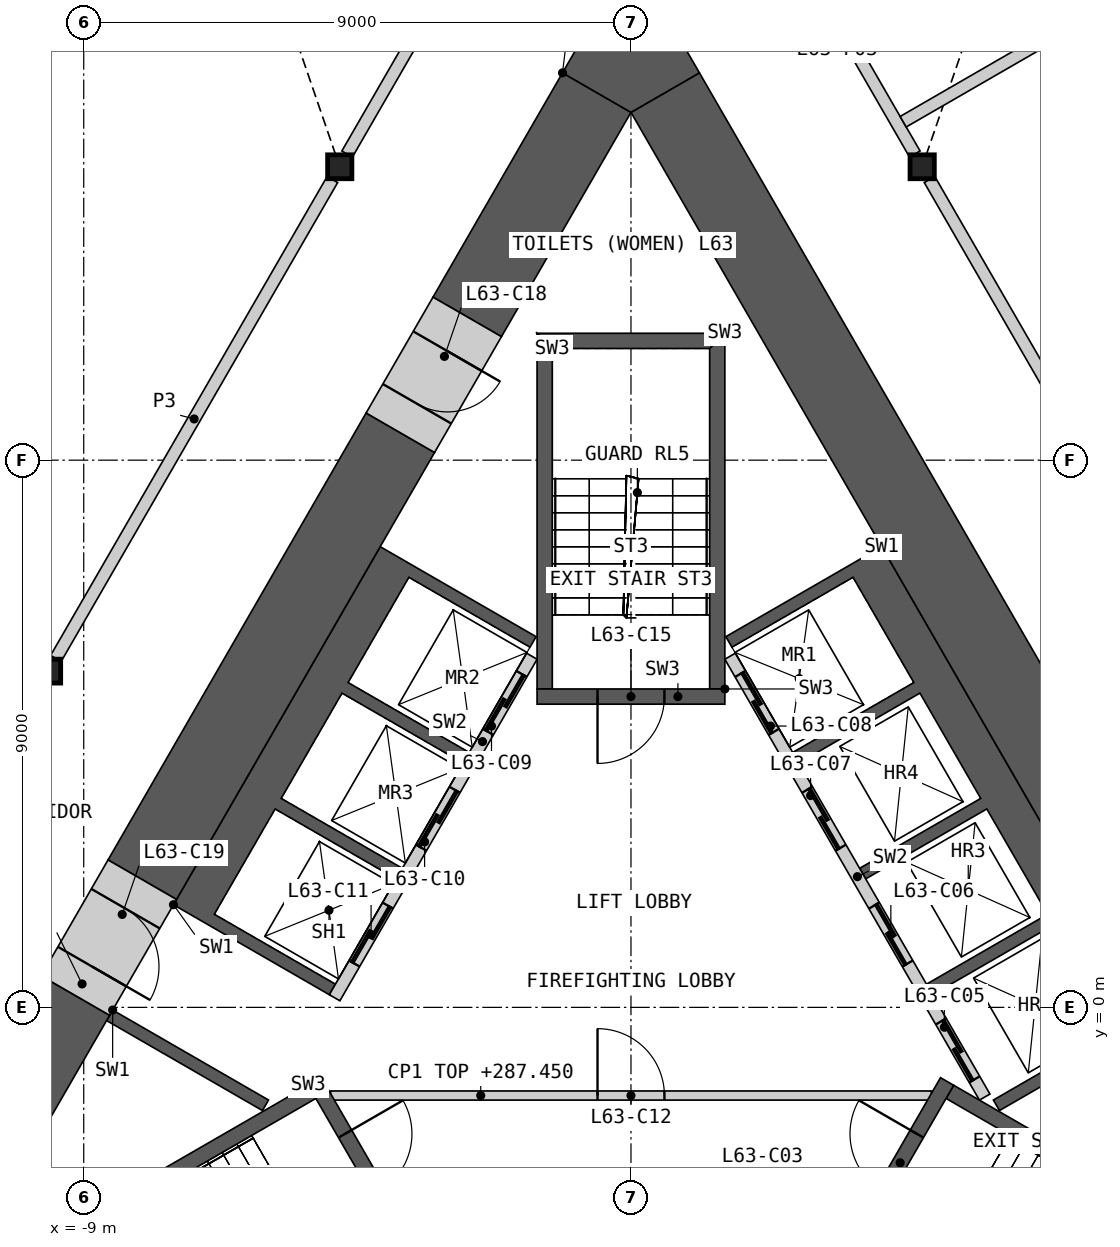
"""IFC4 building model, lengths in metres.
Left out: names, types, materials, properties, quantities, classifications, styles, units other than length and angle.
Written with IfcOpenShell. Run it as: python <this file> out.ifc"""

import sys

from ifc_helpers import new_model, si_unit, direction, frame, frame_2d, origin, origin_2d, place, context, subcontext, project, spatial, polyline, rectangle, i_section, outline, extrude, element, fill, save


model = new_model("IFC4")
c1 = context("Model", 3, precision=1e-05, world=origin(), true_north=direction((0.0, 1.0)))
c2 = subcontext(c1, "Body", "Model", "MODEL_VIEW")
j1 = project(units=[si_unit("LENGTHUNIT", "METRE"), si_unit("PLANEANGLEUNIT", "RADIAN")], contexts=[c1])
p1 = place(None, origin())
s1 = spatial("IfcSite", under=j1, at=p1, CompositionType="ELEMENT")
p2 = place(p1, origin())
s2 = spatial("IfcBuilding", under=s1, at=p2, CompositionType="ELEMENT")
p3 = place(p2, frame((0.0, 0.0, 277.8)))
s3 = spatial("IfcBuildingStorey", under=s2, at=p3, CompositionType="ELEMENT", Elevation=277.8)
for number, where, z_axis, x_axis in (
    (1, (-4.789, 13.825, 0.0), (0.0, 0.0, 1.0), (1.0, 0.0, 0.0)),
    (2, (-9.578, 5.53, 0.0), (0.0, 0.0, 1.0), (1.0, 0.0, 0.0)),
    (3, (4.789, 13.825, 0.0), (0.0, 0.0, 1.0), (1.0, 0.0, 0.0)),
):
    element("IfcColumn", number, at=place(p3, frame(where, z_axis=z_axis, x_axis=x_axis)), inside=s3, PredefinedType="COLUMN", context=c2, shape_type="SweptSolid", body=[
        extrude(i_section(OverallWidth=0.399, OverallDepth=0.393, WebThickness=0.023, FlangeThickness=0.037, at=origin_2d()), origin(), (0.0, 0.0, 1.0), 10.0),
    ])
p4 = place(p3, origin())
e4 = element("IfcWall", 4, at=p4, inside=s3, PredefinedType="SHEAR", context=c2, shape_type="SweptSolid", body=[
    extrude(outline(polyline([(4.124, 7.577), (8.624, -0.217), (8.231, -0.444), (6.061, -1.697), (5.96, -1.524), (7.952, -0.374), (6.952, 1.358), (4.96, 0.208), (4.861, 0.381), (6.852, 1.531), (5.852, 3.263), (3.861, 2.113), (3.76, 2.287), (5.752, 3.437), (4.752, 5.169), (2.76, 4.019), (2.66, 4.192), (4.652, 5.342), (3.652, 7.074), (1.66, 5.924), (1.561, 6.097), (3.731, 7.35), (4.124, 7.577)])), origin(), (0.0, 0.0, 1.0), 9.65),
])
p5 = place(p3, frame((5.817, -1.476, 0.0), z_axis=(0.0, 0.0, 1.0), x_axis=(-0.500002616675, 0.866023893041, 0.0)))
e5 = element("IfcWall", 5, at=p5, inside=s3, PredefinedType="SOLIDWALL", context=c2, shape_type="SweptSolid", body=[
    extrude(rectangle(XDim=8.373, YDim=0.2, at=frame_2d((4.187, 0.0))), origin(), (0.0, 0.0, 1.0), 9.65),
])
p6 = place(p5, frame((0.337, 0.0, 0.0)))
e6 = element("IfcOpeningElement", 6, at=p6, cuts=e5, PredefinedType="OPENING", context=c2, shape_type="SweptSolid", body=[
    extrude(rectangle(XDim=1.1, YDim=2.1, at=frame_2d((0.55, 1.05))), frame((0.0, 0.11, 0.0), z_axis=(0.0, -1.0, 0.0), x_axis=(1.0, 0.0, 0.0)), (0.0, 0.0, 1.0), 0.22),
])
p7 = place(p5, frame((2.537, 0.0, 0.0)))
e7 = element("IfcOpeningElement", 7, at=p7, cuts=e5, PredefinedType="OPENING", context=c2, shape_type="SweptSolid", body=[
    extrude(rectangle(XDim=1.1, YDim=2.1, at=frame_2d((0.55, 1.05))), frame((0.0, 0.11, 0.0), z_axis=(0.0, -1.0, 0.0), x_axis=(1.0, 0.0, 0.0)), (0.0, 0.0, 1.0), 0.22),
])
p8 = place(p5, frame((4.737, 0.0, 0.0)))
e8 = element("IfcOpeningElement", 8, at=p8, cuts=e5, PredefinedType="OPENING", context=c2, shape_type="SweptSolid", body=[
    extrude(rectangle(XDim=1.1, YDim=2.1, at=frame_2d((0.55, 1.05))), frame((0.0, 0.11, 0.0), z_axis=(0.0, -1.0, 0.0), x_axis=(1.0, 0.0, 0.0)), (0.0, 0.0, 1.0), 0.22),
])
p9 = place(p5, frame((6.937, 0.0, 0.0)))
e9 = element("IfcOpeningElement", 9, at=p9, cuts=e5, PredefinedType="OPENING", context=c2, shape_type="SweptSolid", body=[
    extrude(rectangle(XDim=1.1, YDim=2.1, at=frame_2d((0.55, 1.05))), frame((0.0, 0.11, 0.0), z_axis=(0.0, -1.0, 0.0), x_axis=(1.0, 0.0, 0.0)), (0.0, 0.0, 1.0), 0.22),
])
p10 = place(p3, origin())
e10 = element("IfcWall", 10, at=p10, inside=s3, PredefinedType="SHEAR", context=c2, shape_type="SweptSolid", body=[
    extrude(outline(polyline([(-7.524, 1.688), (-4.124, 7.577), (-3.731, 7.35), (-1.561, 6.097), (-1.66, 5.924), (-3.652, 7.074), (-4.652, 5.342), (-2.66, 4.192), (-2.76, 4.019), (-4.752, 5.169), (-5.752, 3.437), (-3.76, 2.287), (-3.861, 2.113), (-5.852, 3.263), (-6.852, 1.531), (-4.861, 0.381), (-4.96, 0.208), (-7.131, 1.461), (-7.524, 1.688)])), origin(), (0.0, 0.0, 1.0), 9.65),
])
p11 = place(p3, origin())
e11 = element("IfcWall", 11, at=p11, inside=s3, PredefinedType="SHEAR", context=c2, shape_type="SweptSolid", body=[
    extrude(outline(polyline([(-8.524, -0.044), (-8.131, -0.271), (-5.96, -1.524), (-6.061, -1.697), (-8.231, -0.444), (-8.624, -0.217), (-8.524, -0.044)])), origin(), (0.0, 0.0, 1.0), 9.65),
])
p12 = place(p3, frame((-1.631, 5.776, 0.0), z_axis=(0.0, 0.0, 1.0), x_axis=(-0.499992876559, -0.866029516466, 0.0)))
e12 = element("IfcWall", 12, at=p12, inside=s3, PredefinedType="SOLIDWALL", context=c2, shape_type="SweptSolid", body=[
    extrude(rectangle(XDim=6.486, YDim=0.2, at=frame_2d((3.243, 0.0))), origin(), (0.0, 0.0, 1.0), 9.65),
])
p13 = place(p12, frame((0.337, 0.0, 0.0)))
e13 = element("IfcOpeningElement", 13, at=p13, cuts=e12, PredefinedType="OPENING", context=c2, shape_type="SweptSolid", body=[
    extrude(rectangle(XDim=1.1, YDim=2.1, at=frame_2d((0.55, 1.05))), frame((0.0, 0.11, 0.0), z_axis=(0.0, -1.0, 0.0), x_axis=(1.0, 0.0, 0.0)), (0.0, 0.0, 1.0), 0.22),
])
p14 = place(p12, frame((2.537, 0.0, 0.0)))
e14 = element("IfcOpeningElement", 14, at=p14, cuts=e12, PredefinedType="OPENING", context=c2, shape_type="SweptSolid", body=[
    extrude(rectangle(XDim=1.1, YDim=2.1, at=frame_2d((0.55, 1.05))), frame((0.0, 0.11, 0.0), z_axis=(0.0, -1.0, 0.0), x_axis=(1.0, 0.0, 0.0)), (0.0, 0.0, 1.0), 0.22),
])
p15 = place(p12, frame((4.737, 0.0, 0.0)))
e15 = element("IfcOpeningElement", 15, at=p15, cuts=e12, PredefinedType="OPENING", context=c2, shape_type="SweptSolid", body=[
    extrude(rectangle(XDim=1.1, YDim=2.1, at=frame_2d((0.55, 1.05))), frame((0.0, 0.11, 0.0), z_axis=(0.0, -1.0, 0.0), x_axis=(1.0, 0.0, 0.0)), (0.0, 0.0, 1.0), 0.22),
])
p16 = place(p3, frame((-4.941, -1.45, 0.0), z_axis=(0.0, 0.0, 1.0), x_axis=(1.0, 0.0, 0.0)))
e16 = element("IfcWall", 16, at=p16, inside=s3, PredefinedType="PARTITIONING", context=c2, shape_type="SweptSolid", body=[
    extrude(rectangle(XDim=9.882, YDim=0.15, at=frame_2d((4.941, 0.0))), origin(), (0.0, 0.0, 1.0), 9.65),
])
p17 = place(p16, frame((4.391, 0.0, 0.0)))
e17 = element("IfcOpeningElement", 17, at=p17, cuts=e16, PredefinedType="OPENING", context=c2, shape_type="SweptSolid", body=[
    extrude(rectangle(XDim=1.1, YDim=2.1, at=frame_2d((0.55, 1.05))), frame((0.0, 0.085, 0.0), z_axis=(0.0, -1.0, 0.0), x_axis=(1.0, 0.0, 0.0)), (0.0, 0.0, 1.0), 0.17),
])
p18 = place(p3, origin())
e18 = element("IfcWall", 18, at=p18, inside=s3, PredefinedType="SHEAR", context=c2, shape_type="SweptSolid", body=[
    extrude(outline(polyline([(-5.307, -1.281), (-10.374, -4.206), (-10.032, -4.298), (-5.182, -1.498), (-5.307, -1.281)])), origin(), (0.0, 0.0, 1.0), 9.65),
])
p19 = place(p3, frame((-5.199, -1.219, 0.0), z_axis=(0.0, 0.0, 1.0), x_axis=(0.499982516597, -0.866035497597, 0.0)))
e19 = element("IfcWall", 19, at=p19, inside=s3, PredefinedType="SHEAR", context=c2, shape_type="SweptSolid", body=[
    extrude(rectangle(XDim=3.088, YDim=0.25, at=frame_2d((1.544, 0.0))), origin(), (0.0, 0.0, 1.0), 9.65),
])
p20 = place(p19, frame((0.994, 0.0, 0.0)))
e20 = element("IfcOpeningElement", 20, at=p20, cuts=e19, PredefinedType="OPENING", context=c2, shape_type="SweptSolid", body=[
    extrude(rectangle(XDim=1.1, YDim=2.1, at=frame_2d((0.55, 1.05))), frame((0.0, 0.135, 0.0), z_axis=(0.0, -1.0, 0.0), x_axis=(1.0, 0.0, 0.0)), (0.0, 0.0, 1.0), 0.27),
])
p21 = place(p3, origin())
e21 = element("IfcWall", 21, at=p21, inside=s3, PredefinedType="SHEAR", context=c2, shape_type="SweptSolid", body=[
    extrude(outline(polyline([(10.032, -4.298), (10.374, -4.206), (5.307, -1.281), (5.182, -1.498), (10.032, -4.298)])), origin(), (0.0, 0.0, 1.0), 9.65),
])
p22 = place(p3, frame((3.655, -3.893, 0.0), z_axis=(0.0, 0.0, 1.0), x_axis=(0.499982516597, 0.866035497597, 0.0)))
e22 = element("IfcWall", 22, at=p22, inside=s3, PredefinedType="SHEAR", context=c2, shape_type="SweptSolid", body=[
    extrude(rectangle(XDim=3.088, YDim=0.25, at=frame_2d((1.544, 0.0))), origin(), (0.0, 0.0, 1.0), 9.65),
])
p23 = place(p22, frame((0.994, 0.0, 0.0)))
e23 = element("IfcOpeningElement", 23, at=p23, cuts=e22, PredefinedType="OPENING", context=c2, shape_type="SweptSolid", body=[
    extrude(rectangle(XDim=1.1, YDim=2.1, at=frame_2d((0.55, 1.05))), frame((0.0, 0.135, 0.0), z_axis=(0.0, -1.0, 0.0), x_axis=(1.0, 0.0, 0.0)), (0.0, 0.0, 1.0), 0.27),
])
p24 = place(p3, origin())
e24 = element("IfcWall", 24, at=p24, inside=s3, PredefinedType="SHEAR", context=c2, shape_type="SweptSolid", body=[
    extrude(outline(polyline([(1.544, 5.237), (1.544, 11.087), (1.294, 10.837), (1.294, 5.237), (1.544, 5.237)])), origin(), (0.0, 0.0, 1.0), 9.65),
])
p25 = place(p3, origin())
e25 = element("IfcWall", 25, at=p25, inside=s3, PredefinedType="SHEAR", context=c2, shape_type="SweptSolid", body=[
    extrude(outline(polyline([(1.544, 11.087), (-1.544, 11.087), (-1.294, 10.837), (1.294, 10.837), (1.544, 11.087)])), origin(), (0.0, 0.0, 1.0), 9.65),
])
p26 = place(p3, origin())
e26 = element("IfcWall", 26, at=p26, inside=s3, PredefinedType="SHEAR", context=c2, shape_type="SweptSolid", body=[
    extrude(outline(polyline([(-1.294, 10.837), (-1.544, 11.087), (-1.544, 5.237), (-1.294, 5.237), (-1.294, 10.837)])), origin(), (0.0, 0.0, 1.0), 9.65),
])
p27 = place(p3, frame((1.544, 5.112, 0.0), z_axis=(0.0, 0.0, 1.0), x_axis=(-1.0, 0.0, 0.0)))
e27 = element("IfcWall", 27, at=p27, inside=s3, PredefinedType="SHEAR", context=c2, shape_type="SweptSolid", body=[
    extrude(rectangle(XDim=3.088, YDim=0.25, at=frame_2d((1.544, 0.0))), origin(), (0.0, 0.0, 1.0), 9.65),
])
p28 = place(p27, frame((0.994, 0.0, 0.0)))
e28 = element("IfcOpeningElement", 28, at=p28, cuts=e27, PredefinedType="OPENING", context=c2, shape_type="SweptSolid", body=[
    extrude(rectangle(XDim=1.1, YDim=2.1, at=frame_2d((0.55, 1.05))), frame((0.0, 0.135, 0.0), z_axis=(0.0, -1.0, 0.0), x_axis=(1.0, 0.0, 0.0)), (0.0, 0.0, 1.0), 0.27),
])
p29 = place(p3, frame((10.081, -1.441, 0.0), z_axis=(0.0, 0.0, 1.0), x_axis=(-0.500002581376, 0.866023913421, 0.0)))
e29 = element("IfcWall", 29, at=p29, inside=s3, PredefinedType="SHEAR", context=c2, shape_type="SweptSolid", body=[
    extrude(rectangle(XDim=19.037, YDim=1.3, at=frame_2d((9.518, 0.0))), origin(), (0.0, 0.0, 1.0), 9.65),
])
p30 = place(p3, frame((-3.793, 9.451, 0.0), z_axis=(0.0, 0.0, 1.0), x_axis=(-0.499999641798, -0.866025610592, 0.0)))
e30 = element("IfcWall", 30, at=p30, inside=s3, PredefinedType="SHEAR", context=c2, shape_type="SweptSolid", body=[
    extrude(rectangle(XDim=8.488, YDim=1.3, at=frame_2d((4.244, 0.0))), origin(), (0.0, 0.0, 1.0), 9.65),
])
p31 = place(p3, frame((-9.137, 0.195, 0.0), z_axis=(0.0, 0.0, 1.0), x_axis=(-0.499985697398, -0.866033661238, 0.0)))
e31 = element("IfcWall", 31, at=p31, inside=s3, PredefinedType="SHEAR", context=c2, shape_type="SweptSolid", body=[
    extrude(rectangle(XDim=4.362, YDim=1.3, at=frame_2d((2.181, 0.0))), origin(), (0.0, 0.0, 1.0), 9.65),
])
p32 = place(p3, frame((-0.563, 15.045, 0.0), z_axis=(0.0, 0.0, 1.0), x_axis=(-0.50002837164, -0.866009022791, 0.0)))
e32 = element("IfcWall", 32, at=p32, inside=s3, PredefinedType="SHEAR", context=c2, shape_type="SweptSolid", body=[
    extrude(rectangle(XDim=4.26, YDim=1.3, at=frame_2d((2.13, 0.0))), origin(), (0.0, 0.0, 1.0), 9.65),
])
p33 = place(p3, origin())
e33 = element("IfcWall", 33, at=p33, inside=s3, PredefinedType="SHEAR", context=c2, shape_type="SweptSolid", body=[
    extrude(outline(polyline([(-1.126, 15.371), (0.0, 17.321), (1.126, 15.371), (0.0, 14.72), (-1.126, 15.371)])), origin(), (0.0, 0.0, 1.0), 9.65),
])
p34 = place(p3, frame((-2.693, 11.356, 0.0), z_axis=(0.0, 0.0, 1.0), x_axis=(-0.499946605688, -0.86605622881, 0.0)))
e34 = element("IfcWall", 34, at=p34, inside=s3, PredefinedType="SHEAR", context=c2, shape_type="SweptSolid", body=[
    extrude(rectangle(XDim=2.2, YDim=1.3, at=frame_2d((1.1, 0.0))), origin(), (0.0, 0.0, 1.0), 9.65),
])
p35 = place(p34, frame((0.65, 0.0, 0.0)))
e35 = element("IfcOpeningElement", 35, at=p35, cuts=e34, PredefinedType="OPENING", context=c2, shape_type="SweptSolid", body=[
    extrude(rectangle(XDim=1.0, YDim=2.1, at=frame_2d((0.5, 1.05))), frame((0.0, 0.66, 0.0), z_axis=(0.0, -1.0, 0.0), x_axis=(1.0, 0.0, 0.0)), (0.0, 0.0, 1.0), 1.32),
])
p36 = place(p3, frame((-8.037, 2.1, 0.0), z_axis=(0.0, 0.0, 1.0), x_axis=(-0.50002983664, -0.866008176907, 0.0)))
e36 = element("IfcWall", 36, at=p36, inside=s3, PredefinedType="SHEAR", context=c2, shape_type="SweptSolid", body=[
    extrude(rectangle(XDim=2.2, YDim=1.3, at=frame_2d((1.1, 0.0))), origin(), (0.0, 0.0, 1.0), 9.65),
])
p37 = place(p36, frame((0.55, 0.0, 0.0)))
e37 = element("IfcOpeningElement", 37, at=p37, cuts=e36, PredefinedType="OPENING", context=c2, shape_type="SweptSolid", body=[
    extrude(rectangle(XDim=1.1, YDim=2.1, at=frame_2d((0.55, 1.05))), frame((0.0, 0.66, 0.0), z_axis=(0.0, -1.0, 0.0), x_axis=(1.0, 0.0, 0.0)), (0.0, 0.0, 1.0), 1.32),
])
for number, where, z_axis, x_axis in (
    (38, (4.91, 13.616, 0.0), (0.0, 0.0, 1.0), (0.5, -0.866, 0.0)),
    (39, (-9.458, 5.74, 0.0), (0.0, 0.0, 1.0), (0.5, 0.866, 0.0)),
):
    element("IfcWall", number, at=place(p3, frame(where, z_axis=z_axis, x_axis=x_axis)), inside=s3, PredefinedType="PARTITIONING", context=c2, shape_type="SweptSolid", body=[
        extrude(rectangle(XDim=9.095, YDim=0.2, at=frame_2d((4.547, 0.0))), origin(), (0.0, 0.0, 1.0), 9.65),
    ])
p38 = place(p3, frame((-4.668, 14.035, 0.0), z_axis=(0.0, 0.0, 1.0), x_axis=(0.499984524817, 0.866034338201, 0.0)))
e40 = element("IfcWall", 40, at=p38, inside=s3, PredefinedType="PARTITIONING", context=c2, shape_type="SweptSolid", body=[
    extrude(rectangle(XDim=5.51, YDim=0.2, at=frame_2d((2.755, 0.0))), origin(), (0.0, 0.0, 1.0), 9.65),
])
p39 = place(p3, frame((1.913, 18.807, 0.0), z_axis=(0.0, 0.0, 1.0), x_axis=(0.499984524817, -0.866034338201, 0.0)))
e41 = element("IfcWall", 41, at=p39, inside=s3, PredefinedType="PARTITIONING", context=c2, shape_type="SweptSolid", body=[
    extrude(rectangle(XDim=5.51, YDim=0.2, at=frame_2d((2.755, 0.0))), origin(), (0.0, 0.0, 1.0), 9.65),
])
p40 = place(p39, frame((2.055, 0.0, 0.0)))
e42 = element("IfcOpeningElement", 42, at=p40, cuts=e41, PredefinedType="OPENING", context=c2, shape_type="SweptSolid", body=[
    extrude(rectangle(XDim=1.0, YDim=2.1, at=frame_2d((0.5, 1.05))), frame((0.0, 0.11, 0.0), z_axis=(0.0, -1.0, 0.0), x_axis=(1.0, 0.0, 0.0)), (0.0, 0.0, 1.0), 0.22),
])
p41 = place(p3, frame((4.477, 14.566, 0.0), z_axis=(0.0, 0.0, 1.0), x_axis=(0.866024427045, 0.500001691758, 0.0)))
e43 = element("IfcWall", 43, at=p41, inside=s3, PredefinedType="PARTITIONING", context=c2, shape_type="SweptSolid", body=[
    extrude(rectangle(XDim=12.311, YDim=0.2, at=frame_2d((6.156, 0.0))), origin(), (0.0, 0.0, 1.0), 8.804),
])
p42 = place(p6, origin())
e44 = element("IfcDoor", 44, at=p42, inside=s3, OperationType="SLIDING_TO_LEFT", PredefinedType="DOOR", context=c2, shape_type="SweptSolid", body=[
    extrude(rectangle(XDim=1.1, YDim=2.1, at=frame_2d((0.55, 1.05))), frame((0.0, 0.025, 0.0), z_axis=(0.0, -1.0, 0.0), x_axis=(1.0, 0.0, 0.0)), (0.0, 0.0, 1.0), 0.05),
])
fill(e6, e44)
p43 = place(p7, origin())
e45 = element("IfcDoor", 45, at=p43, inside=s3, OperationType="SLIDING_TO_LEFT", PredefinedType="DOOR", context=c2, shape_type="SweptSolid", body=[
    extrude(rectangle(XDim=1.1, YDim=2.1, at=frame_2d((0.55, 1.05))), frame((0.0, 0.025, 0.0), z_axis=(0.0, -1.0, 0.0), x_axis=(1.0, 0.0, 0.0)), (0.0, 0.0, 1.0), 0.05),
])
fill(e7, e45)
p44 = place(p8, origin())
e46 = element("IfcDoor", 46, at=p44, inside=s3, OperationType="SLIDING_TO_LEFT", PredefinedType="DOOR", context=c2, shape_type="SweptSolid", body=[
    extrude(rectangle(XDim=1.1, YDim=2.1, at=frame_2d((0.55, 1.05))), frame((0.0, 0.025, 0.0), z_axis=(0.0, -1.0, 0.0), x_axis=(1.0, 0.0, 0.0)), (0.0, 0.0, 1.0), 0.05),
])
fill(e8, e46)
p45 = place(p9, origin())
e47 = element("IfcDoor", 47, at=p45, inside=s3, OperationType="SLIDING_TO_LEFT", PredefinedType="DOOR", context=c2, shape_type="SweptSolid", body=[
    extrude(rectangle(XDim=1.1, YDim=2.1, at=frame_2d((0.55, 1.05))), frame((0.0, 0.025, 0.0), z_axis=(0.0, -1.0, 0.0), x_axis=(1.0, 0.0, 0.0)), (0.0, 0.0, 1.0), 0.05),
])
fill(e9, e47)
p46 = place(p13, origin())
e48 = element("IfcDoor", 48, at=p46, inside=s3, OperationType="SLIDING_TO_LEFT", PredefinedType="DOOR", context=c2, shape_type="SweptSolid", body=[
    extrude(rectangle(XDim=1.1, YDim=2.1, at=frame_2d((0.55, 1.05))), frame((0.0, 0.025, 0.0), z_axis=(0.0, -1.0, 0.0), x_axis=(1.0, 0.0, 0.0)), (0.0, 0.0, 1.0), 0.05),
])
fill(e13, e48)
p47 = place(p14, origin())
e49 = element("IfcDoor", 49, at=p47, inside=s3, OperationType="SLIDING_TO_LEFT", PredefinedType="DOOR", context=c2, shape_type="SweptSolid", body=[
    extrude(rectangle(XDim=1.1, YDim=2.1, at=frame_2d((0.55, 1.05))), frame((0.0, 0.025, 0.0), z_axis=(0.0, -1.0, 0.0), x_axis=(1.0, 0.0, 0.0)), (0.0, 0.0, 1.0), 0.05),
])
fill(e14, e49)
p48 = place(p15, origin())
e50 = element("IfcDoor", 50, at=p48, inside=s3, OperationType="SLIDING_TO_LEFT", PredefinedType="DOOR", context=c2, shape_type="SweptSolid", body=[
    extrude(rectangle(XDim=1.1, YDim=2.1, at=frame_2d((0.55, 1.05))), frame((0.0, 0.025, 0.0), z_axis=(0.0, -1.0, 0.0), x_axis=(1.0, 0.0, 0.0)), (0.0, 0.0, 1.0), 0.05),
])
fill(e15, e50)
p49 = place(p17, origin())
e51 = element("IfcDoor", 51, at=p49, inside=s3, OperationType="SINGLE_SWING_LEFT", PredefinedType="DOOR", context=c2, shape_type="SweptSolid", body=[
    extrude(rectangle(XDim=1.1, YDim=2.1, at=frame_2d((0.55, 1.05))), frame((0.0, 0.025, 0.0), z_axis=(0.0, -1.0, 0.0), x_axis=(1.0, 0.0, 0.0)), (0.0, 0.0, 1.0), 0.05),
])
fill(e17, e51)
p50 = place(p20, origin())
e52 = element("IfcDoor", 52, at=p50, inside=s3, OperationType="SINGLE_SWING_LEFT", PredefinedType="DOOR", context=c2, shape_type="SweptSolid", body=[
    extrude(rectangle(XDim=1.1, YDim=2.1, at=frame_2d((0.55, 1.05))), frame((0.0, 0.025, 0.0), z_axis=(0.0, -1.0, 0.0), x_axis=(1.0, 0.0, 0.0)), (0.0, 0.0, 1.0), 0.05),
])
fill(e20, e52)
p51 = place(p23, origin())
e53 = element("IfcDoor", 53, at=p51, inside=s3, OperationType="SINGLE_SWING_RIGHT", PredefinedType="DOOR", context=c2, shape_type="SweptSolid", body=[
    extrude(rectangle(XDim=1.1, YDim=2.1, at=frame_2d((0.55, 1.05))), frame((0.0, 0.025, 0.0), z_axis=(0.0, -1.0, 0.0), x_axis=(1.0, 0.0, 0.0)), (0.0, 0.0, 1.0), 0.05),
])
fill(e23, e53)
p52 = place(p28, origin())
e54 = element("IfcDoor", 54, at=p52, inside=s3, OperationType="SINGLE_SWING_RIGHT", PredefinedType="DOOR", context=c2, shape_type="SweptSolid", body=[
    extrude(rectangle(XDim=1.1, YDim=2.1, at=frame_2d((0.55, 1.05))), frame((0.0, 0.025, 0.0), z_axis=(0.0, -1.0, 0.0), x_axis=(1.0, 0.0, 0.0)), (0.0, 0.0, 1.0), 0.05),
])
fill(e28, e54)
p53 = place(p35, origin())
e55 = element("IfcDoor", 55, at=p53, inside=s3, OperationType="SINGLE_SWING_LEFT", PredefinedType="DOOR", context=c2, shape_type="SweptSolid", body=[
    extrude(rectangle(XDim=1.0, YDim=2.1, at=frame_2d((0.5, 1.05))), frame((0.0, 0.405, 0.0), z_axis=(0.0, -1.0, 0.0), x_axis=(1.0, 0.0, 0.0)), (0.0, 0.0, 1.0), 0.05),
])
fill(e35, e55)
p54 = place(p37, origin())
e56 = element("IfcDoor", 56, at=p54, inside=s3, OperationType="SINGLE_SWING_RIGHT", PredefinedType="DOOR", context=c2, shape_type="SweptSolid", body=[
    extrude(rectangle(XDim=1.1, YDim=2.1, at=frame_2d((0.55, 1.05))), frame((0.0, 0.405, 0.0), z_axis=(0.0, -1.0, 0.0), x_axis=(1.0, 0.0, 0.0)), (0.0, 0.0, 1.0), 0.05),
])
fill(e37, e56)
save(model, sys.argv[1])
